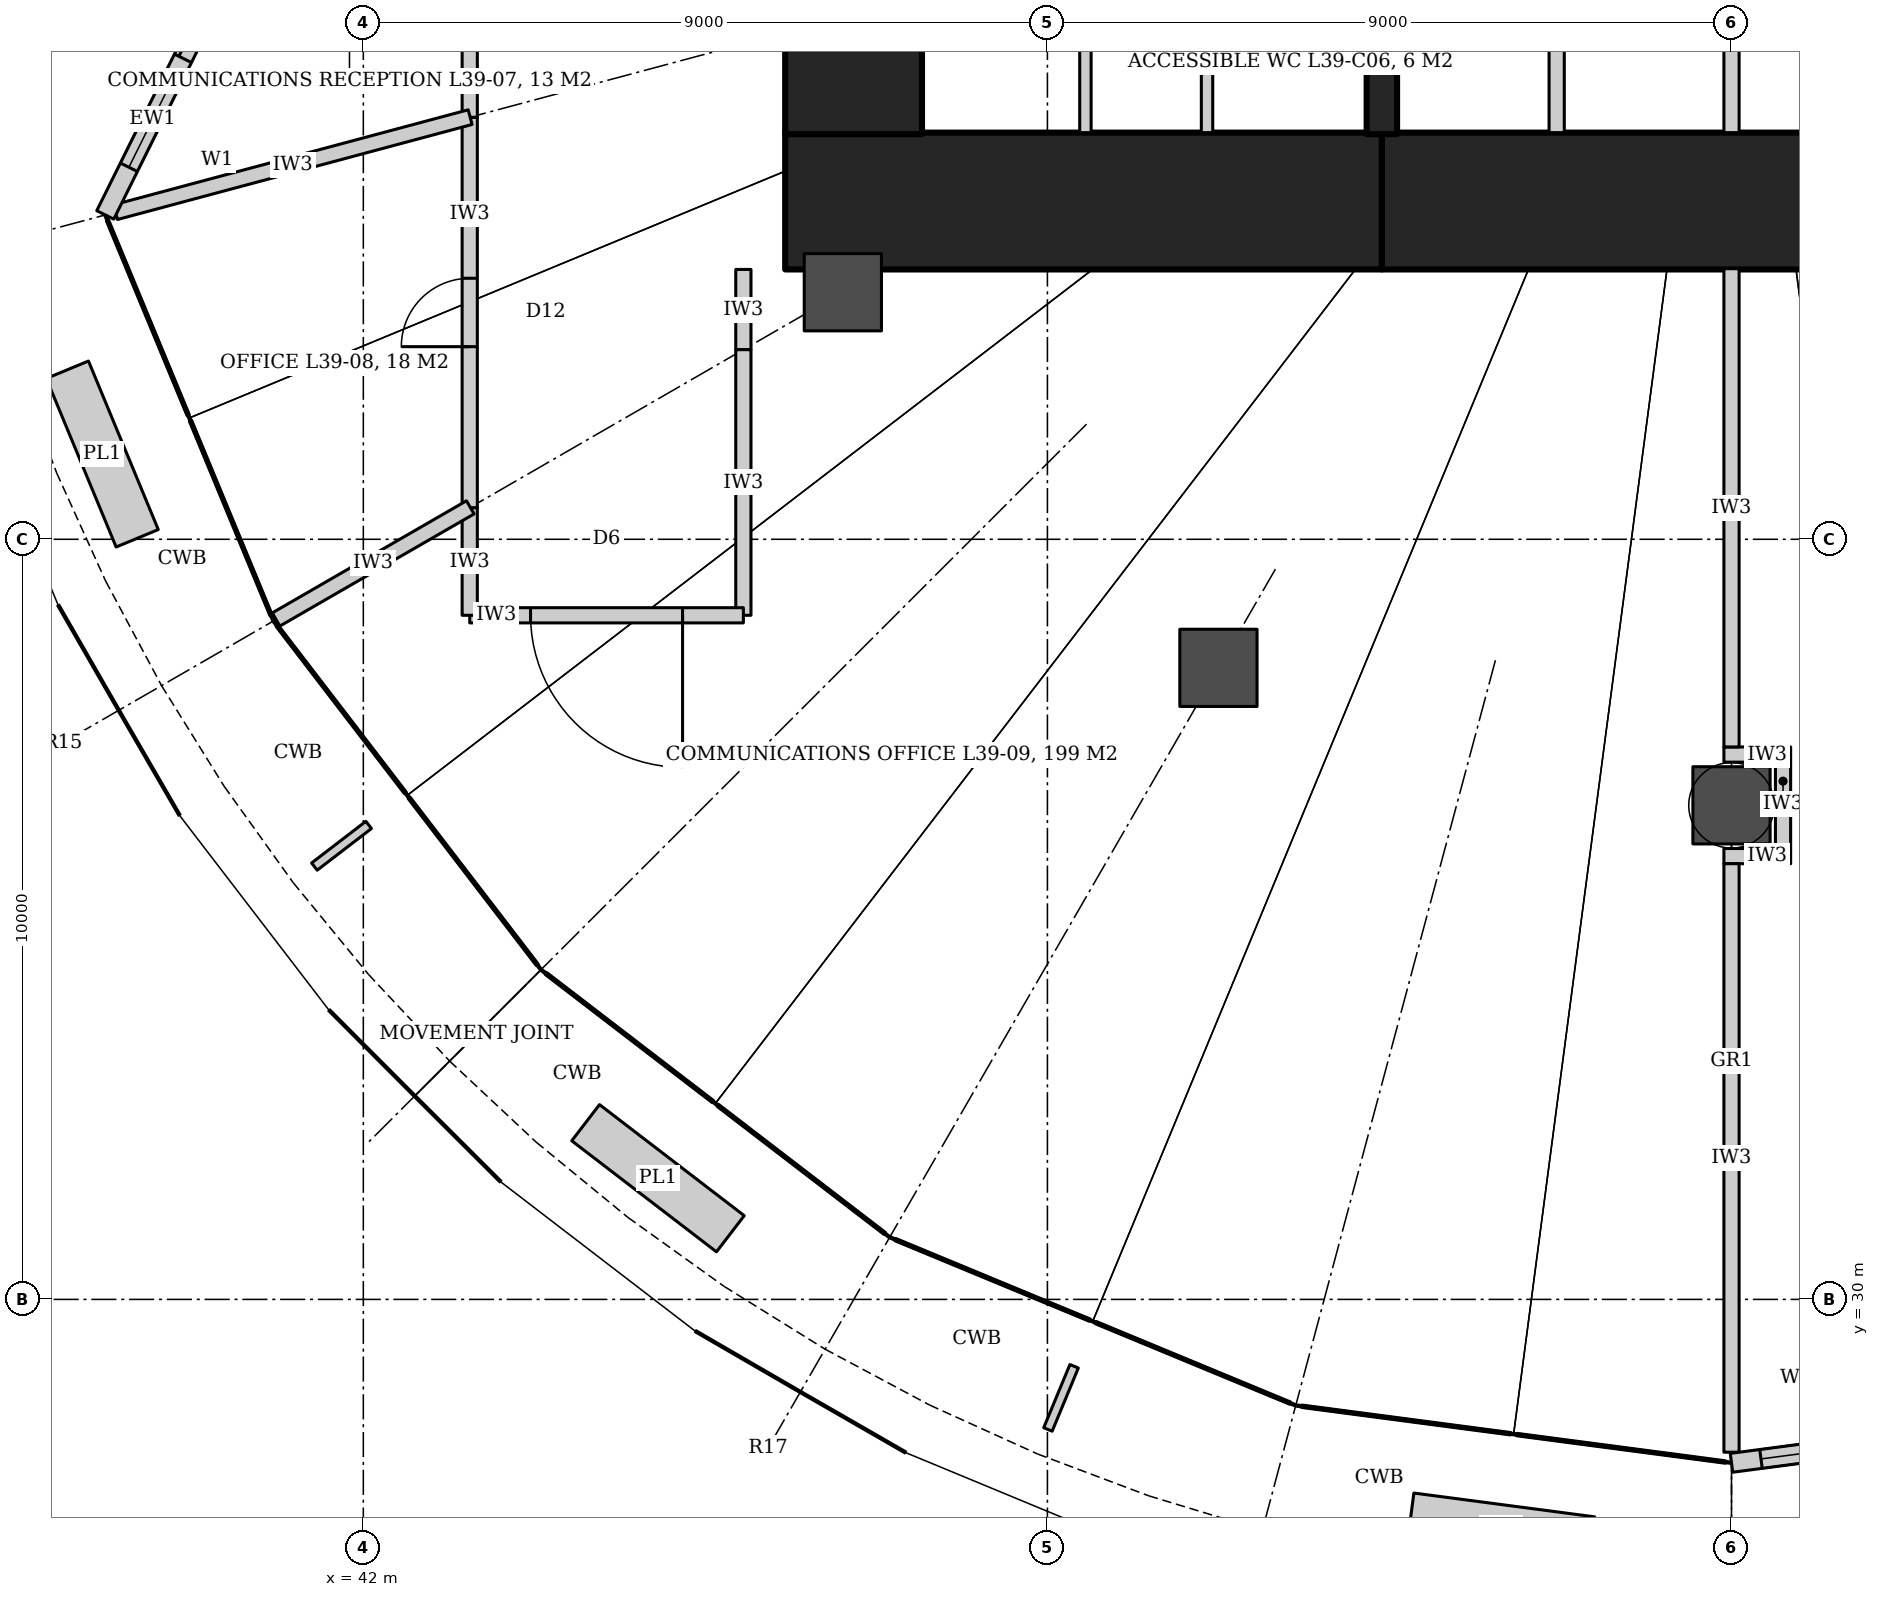
"""IFC4 building model, lengths in metres.
Left out: names, types, materials, properties, quantities, classifications, styles, units other than length and angle.
Written with IfcOpenShell. Run it as: python <this file> out.ifc"""

import sys

from ifc_helpers import new_model, si_unit, direction, frame, frame_2d, origin, origin_2d, place, context, subcontext, project, spatial, rectangle, hollow_circle, extrude, element, fill, save


model = new_model("IFC4")
c1 = context("Model", 3, precision=1e-05, world=origin(), true_north=direction((0.0, 1.0)))
c2 = subcontext(c1, "Body", "Model", "MODEL_VIEW")
j1 = project(units=[si_unit("LENGTHUNIT", "METRE"), si_unit("PLANEANGLEUNIT", "RADIAN")], contexts=[c1])
p1 = place(None, origin())
s1 = spatial("IfcSite", under=j1, at=p1, CompositionType="ELEMENT")
p2 = place(p1, origin())
s2 = spatial("IfcBuilding", under=s1, at=p2, CompositionType="ELEMENT")
p3 = place(p2, frame((0.0, 0.0, 173.0)))
s3 = spatial("IfcBuildingStorey", under=s2, at=p3, CompositionType="ELEMENT", Elevation=173.0)
p4 = place(p3, frame((47.55, 44.45, 0.0), z_axis=(0.0, 0.0, 1.0), x_axis=(1.0, 0.0, 0.0)))
e1 = element("IfcWall", 1, at=p4, inside=s3, PredefinedType="SHEAR", context=c2, shape_type="SweptSolid", body=[
    extrude(rectangle(XDim=7.85, YDim=1.8, at=frame_2d((3.925, 0.0))), origin(), (0.0, 0.0, 1.0), 4.2),
])
p5 = place(p3, frame((55.4, 44.45, 0.0), z_axis=(0.0, 0.0, 1.0), x_axis=(1.0, 0.0, 0.0)))
e2 = element("IfcWall", 2, at=p5, inside=s3, PredefinedType="SHEAR", context=c2, shape_type="SweptSolid", body=[
    extrude(rectangle(XDim=9.2, YDim=1.8, at=frame_2d((4.6, 0.0))), origin(), (0.0, 0.0, 1.0), 4.2),
])
p6 = place(p3, frame((48.45, 45.33, 0.0), z_axis=(0.0, 0.0, 1.0), x_axis=(0.0, 1.0, 0.0)))
e3 = element("IfcWall", 3, at=p6, inside=s3, PredefinedType="SHEAR", context=c2, shape_type="SweptSolid", body=[
    extrude(rectangle(XDim=3.17, YDim=1.8, at=frame_2d((1.585, 0.0))), origin(), (0.0, 0.0, 1.0), 4.2),
])
p7 = place(p3, frame((55.4, 48.32, 0.0), z_axis=(0.0, 0.0, 1.0), x_axis=(0.0, -1.0, 0.0)))
e4 = element("IfcWall", 4, at=p7, inside=s3, PredefinedType="SHEAR", context=c2, shape_type="SweptSolid", body=[
    extrude(rectangle(XDim=2.99, YDim=0.4, at=frame_2d((1.495, 0.0))), origin(), (0.0, 0.0, 1.0), 4.2),
])
for number, where, z_axis, x_axis in (
    (5, (48.309, 43.25, 0.0), (0.0, 0.0, 1.0), (1.0, 0.0, 0.0)),
    (6, (53.25, 38.309, 0.0), (0.0, 0.0, 1.0), (1.0, 0.0, 0.0)),
    (7, (60.0, 36.5, 0.0), (0.0, 0.0, 1.0), (1.0, 0.0, 0.0)),
):
    element("IfcColumn", number, at=place(p3, frame(where, z_axis=z_axis, x_axis=x_axis)), inside=s3, PredefinedType="COLUMN", context=c2, shape_type="SweptSolid", body=[
        extrude(hollow_circle(Radius=0.508, WallThickness=0.05, at=origin_2d()), origin(), (0.0, 0.0, 1.0), 4.2),
    ])
p8 = place(p3, frame((47.0, 43.55, 0.0), z_axis=(0.0, 0.0, 1.0), x_axis=(0.0, -1.0, 0.0)))
e8 = element("IfcWall", 8, at=p8, inside=s3, PredefinedType="PARTITIONING", context=c2, shape_type="SweptSolid", body=[
    extrude(rectangle(XDim=1.056, YDim=0.2, at=frame_2d((0.528, 0.0))), origin(), (0.0, 0.0, 1.0), 3.012),
])
p9 = place(p3, frame((47.0, 42.494, 0.0), z_axis=(0.0, 0.0, 1.0), x_axis=(0.0, -1.0, 0.0)))
e9 = element("IfcWall", 9, at=p9, inside=s3, PredefinedType="PARTITIONING", context=c2, shape_type="SweptSolid", body=[
    extrude(rectangle(XDim=3.494, YDim=0.2, at=frame_2d((1.747, 0.0))), origin(), (0.0, 0.0, 1.0), 3.012),
])
p10 = place(p3, frame((47.0, 39.0, 0.0), z_axis=(0.0, 0.0, 1.0), x_axis=(-1.0, 0.0, 0.0)))
e10 = element("IfcWall", 10, at=p10, inside=s3, PredefinedType="PARTITIONING", context=c2, shape_type="SweptSolid", body=[
    extrude(rectangle(XDim=3.6, YDim=0.2, at=frame_2d((1.8, 0.0))), origin(), (0.0, 0.0, 1.0), 3.04),
])
p11 = place(p10, frame((0.8, 0.0, 0.0)))
e11 = element("IfcOpeningElement", 11, at=p11, cuts=e10, PredefinedType="OPENING", context=c2, shape_type="SweptSolid", body=[
    extrude(rectangle(XDim=2.0, YDim=2.1, at=frame_2d((1.0, 1.05))), frame((0.0, 0.11, 0.0), z_axis=(0.0, -1.0, 0.0), x_axis=(1.0, 0.0, 0.0)), (0.0, 0.0, 1.0), 0.22),
])
p12 = place(p3, frame((43.4, 39.0, 0.0), z_axis=(0.0, 0.0, 1.0), x_axis=(0.0, 1.0, 0.0)))
e12 = element("IfcWall", 12, at=p12, inside=s3, PredefinedType="PARTITIONING", context=c2, shape_type="SweptSolid", body=[
    extrude(rectangle(XDim=1.416, YDim=0.2, at=frame_2d((0.708, 0.0))), origin(), (0.0, 0.0, 1.0), 3.012),
])
p13 = place(p3, frame((43.4, 40.416, 0.0), z_axis=(0.0, 0.0, 1.0), x_axis=(0.0, 1.0, 0.0)))
e13 = element("IfcWall", 13, at=p13, inside=s3, PredefinedType="PARTITIONING", context=c2, shape_type="SweptSolid", body=[
    extrude(rectangle(XDim=5.136, YDim=0.2, at=frame_2d((2.568, 0.0))), origin(), (0.0, 0.0, 1.0), 3.012),
])
p14 = place(p13, frame((2.118, 0.0, 0.0)))
e14 = element("IfcOpeningElement", 14, at=p14, cuts=e13, PredefinedType="OPENING", context=c2, shape_type="SweptSolid", body=[
    extrude(rectangle(XDim=0.9, YDim=2.4, at=frame_2d((0.45, 1.2))), frame((0.0, 0.11, 0.0), z_axis=(0.0, -1.0, 0.0), x_axis=(1.0, 0.0, 0.0)), (0.0, 0.0, 1.0), 0.22),
])
p15 = place(p3, frame((43.4, 45.552, 0.0), z_axis=(0.0, 0.0, 1.0), x_axis=(0.0, 1.0, 0.0)))
e15 = element("IfcWall", 15, at=p15, inside=s3, PredefinedType="PARTITIONING", context=c2, shape_type="SweptSolid", body=[
    extrude(rectangle(XDim=4.448, YDim=0.2, at=frame_2d((2.224, 0.0))), origin(), (0.0, 0.0, 1.0), 3.012),
])
p16 = place(p15, frame((1.424, 0.0, 0.0)))
e16 = element("IfcOpeningElement", 16, at=p16, cuts=e15, PredefinedType="OPENING", context=c2, shape_type="SweptSolid", body=[
    extrude(rectangle(XDim=1.6, YDim=2.4, at=frame_2d((0.8, 1.2))), frame((0.0, 0.11, 0.0), z_axis=(0.0, -1.0, 0.0), x_axis=(1.0, 0.0, 0.0)), (0.0, 0.0, 1.0), 0.22),
])
p17 = place(p3, frame((43.406, 45.553, 0.0), z_axis=(0.0, 0.0, 1.0), x_axis=(-0.965932258808, -0.25879503742, 0.0)))
e17 = element("IfcWall", 17, at=p17, inside=s3, PredefinedType="PARTITIONING", context=c2, shape_type="SweptSolid", body=[
    extrude(rectangle(XDim=4.83, YDim=0.2, at=frame_2d((2.415, 0.0))), origin(), (0.0, 0.0, 1.0), 3.012),
])
p18 = place(p3, frame((43.407, 40.42, 0.0), z_axis=(0.0, 0.0, 1.0), x_axis=(-0.866039495442, -0.49997559174, 0.0)))
e18 = element("IfcWall", 18, at=p18, inside=s3, PredefinedType="PARTITIONING", context=c2, shape_type="SweptSolid", body=[
    extrude(rectangle(XDim=2.95, YDim=0.2, at=frame_2d((1.475, 0.0))), origin(), (0.0, 0.0, 1.0), 3.012),
])
for number, where, z_axis, x_axis in (
    (19, (59.9, 37.168, 0.0), (0.0, 0.0, 1.0), (1.0, 0.0, 0.0)),
    (20, (59.9, 35.832, 0.0), (0.0, 0.0, 1.0), (1.0, 0.0, 0.0)),
):
    element("IfcWall", number, at=place(p3, frame(where, z_axis=z_axis, x_axis=x_axis)), inside=s3, PredefinedType="PARTITIONING", context=c2, shape_type="SweptSolid", body=[
        extrude(rectangle(XDim=0.878, YDim=0.2, at=frame_2d((0.439, 0.0))), origin(), (0.0, 0.0, 1.0), 3.012),
    ])
p19 = place(p3, frame((60.678, 37.068, 0.0), z_axis=(0.0, 0.0, 1.0), x_axis=(0.0, -1.0, 0.0)))
e21 = element("IfcWall", 21, at=p19, inside=s3, PredefinedType="PARTITIONING", context=c2, shape_type="SweptSolid", body=[
    extrude(rectangle(XDim=1.136, YDim=0.2, at=frame_2d((0.568, 0.0))), origin(), (0.0, 0.0, 1.0), 3.012),
])
p20 = place(p3, frame((60.0, 43.56, 0.0), z_axis=(0.0, 0.0, 1.0), x_axis=(0.0, -1.0, 0.0)))
e22 = element("IfcWall", 22, at=p20, inside=s3, PredefinedType="PARTITIONING", context=c2, shape_type="SweptSolid", body=[
    extrude(rectangle(XDim=6.292, YDim=0.2, at=frame_2d((3.146, 0.0))), origin(), (0.0, 0.0, 1.0), 3.04),
])
p21 = place(p3, frame((60.0, 35.732, 0.0), z_axis=(0.0, 0.0, 1.0), x_axis=(0.0, -1.0, 0.0)))
e23 = element("IfcWall", 23, at=p21, inside=s3, PredefinedType="PARTITIONING", context=c2, shape_type="SweptSolid", body=[
    extrude(rectangle(XDim=7.742, YDim=0.2, at=frame_2d((3.871, 0.0))), origin(), (0.0, 0.0, 1.0), 3.012),
])
p22 = place(p3, frame((41.45, 50.0, 0.0), z_axis=(0.0, 0.0, 1.0), x_axis=(-0.444556644785, -0.895750740763, 0.0)))
e24 = element("IfcWall", 24, at=p22, inside=s3, PredefinedType="SOLIDWALL", context=c2, shape_type="SweptSolid", body=[
    extrude(rectangle(XDim=6.4, YDim=0.25, at=frame_2d((3.2, 0.0))), origin(), (0.0, 0.0, 1.0), 4.04),
])
p23 = place(p22, frame((2.3, 0.0, 0.0)))
e25 = element("IfcOpeningElement", 25, at=p23, cuts=e24, PredefinedType="OPENING", context=c2, shape_type="SweptSolid", body=[
    extrude(rectangle(XDim=1.8, YDim=2.4, at=frame_2d((0.9, 1.2))), frame((0.0, 0.135, 0.0), z_axis=(0.0, -1.0, 0.0), x_axis=(1.0, 0.0, 0.0)), (0.0, 0.0, 1.0), 0.27),
])
p24 = place(p22, frame((0.7, 0.0, 0.0)))
e26 = element("IfcOpeningElement", 26, at=p24, cuts=e24, PredefinedType="OPENING", context=c2, shape_type="SweptSolid", body=[
    extrude(rectangle(XDim=1.2, YDim=2.4, at=frame_2d((0.6, 1.2))), frame((0.0, 0.135, 0.0), z_axis=(0.0, -1.0, 0.0), x_axis=(1.0, 0.0, 0.0)), (0.0, 0.0, 1.0), 0.27),
])
p25 = place(p22, frame((4.5, 0.0, 0.0)))
e27 = element("IfcOpeningElement", 27, at=p25, cuts=e24, PredefinedType="OPENING", context=c2, shape_type="SweptSolid", body=[
    extrude(rectangle(XDim=1.2, YDim=2.4, at=frame_2d((0.6, 1.2))), frame((0.0, 0.135, 0.0), z_axis=(0.0, -1.0, 0.0), x_axis=(1.0, 0.0, 0.0)), (0.0, 0.0, 1.0), 0.27),
])
p26 = place(p3, frame((60.0, 27.85, 0.0), z_axis=(0.0, 0.0, 1.0), x_axis=(0.991447396143, 0.130506937291, 0.0)))
e28 = element("IfcWall", 28, at=p26, inside=s3, PredefinedType="SOLIDWALL", context=c2, shape_type="SweptSolid", body=[
    extrude(rectangle(XDim=5.782, YDim=0.25, at=frame_2d((2.891, 0.0))), origin(), (0.0, 0.0, 1.0), 4.04),
])
p27 = place(p26, frame((1.991, 0.0, 0.0)))
e29 = element("IfcOpeningElement", 29, at=p27, cuts=e28, PredefinedType="OPENING", context=c2, shape_type="SweptSolid", body=[
    extrude(rectangle(XDim=1.8, YDim=2.4, at=frame_2d((0.9, 1.2))), frame((0.0, 0.135, 0.0), z_axis=(0.0, -1.0, 0.0), x_axis=(1.0, 0.0, 0.0)), (0.0, 0.0, 1.0), 0.27),
])
p28 = place(p26, frame((0.391, 0.0, 0.0)))
e30 = element("IfcOpeningElement", 30, at=p28, cuts=e28, PredefinedType="OPENING", context=c2, shape_type="SweptSolid", body=[
    extrude(rectangle(XDim=1.2, YDim=2.4, at=frame_2d((0.6, 1.2))), frame((0.0, 0.135, 0.0), z_axis=(0.0, -1.0, 0.0), x_axis=(1.0, 0.0, 0.0)), (0.0, 0.0, 1.0), 0.27),
])
p29 = place(p26, frame((4.191, 0.0, 0.0)))
e31 = element("IfcOpeningElement", 31, at=p29, cuts=e28, PredefinedType="OPENING", context=c2, shape_type="SweptSolid", body=[
    extrude(rectangle(XDim=1.2, YDim=2.4, at=frame_2d((0.6, 1.2))), frame((0.0, 0.135, 0.0), z_axis=(0.0, -1.0, 0.0), x_axis=(1.0, 0.0, 0.0)), (0.0, 0.0, 1.0), 0.27),
])
for number, where, z_axis, x_axis in (
    (32, (57.7, 45.35, 0.0), (0.0, 0.0, 1.0), (0.0, 1.0, 0.0)),
    (33, (60.0, 45.35, 0.0), (0.0, 0.0, 1.0), (0.0, 1.0, 0.0)),
):
    element("IfcWall", number, at=place(p3, frame(where, z_axis=z_axis, x_axis=x_axis)), inside=s3, PredefinedType="PARTITIONING", context=c2, shape_type="SweptSolid", body=[
        extrude(rectangle(XDim=2.95, YDim=0.2, at=frame_2d((1.475, 0.0))), origin(), (0.0, 0.0, 1.0), 4.2),
    ])
for number, where, z_axis, x_axis in (
    (34, (51.5, 45.35, 0.0), (0.0, 0.0, 1.0), (0.0, 1.0, 0.0)),
    (35, (53.1, 45.35, 0.0), (0.0, 0.0, 1.0), (0.0, 1.0, 0.0)),
):
    element("IfcWall", number, at=place(p3, frame(where, z_axis=z_axis, x_axis=x_axis)), inside=s3, PredefinedType="PARTITIONING", context=c2, shape_type="SweptSolid", body=[
        extrude(rectangle(XDim=2.95, YDim=0.15, at=frame_2d((1.475, 0.0))), origin(), (0.0, 0.0, 1.0), 4.04),
    ])
p30 = place(p14, origin())
e36 = element("IfcDoor", 36, at=p30, inside=s3, OperationType="SINGLE_SWING_LEFT", PredefinedType="DOOR", context=c2, shape_type="SweptSolid", body=[
    extrude(rectangle(XDim=0.9, YDim=2.4, at=frame_2d((0.45, 1.2))), frame((0.0, 0.025, 0.0), z_axis=(0.0, -1.0, 0.0), x_axis=(1.0, 0.0, 0.0)), (0.0, 0.0, 1.0), 0.05),
])
fill(e14, e36)
p31 = place(p11, origin())
e37 = element("IfcDoor", 37, at=p31, inside=s3, OperationType="DOUBLE_DOOR_DOUBLE_SWING", PredefinedType="DOOR", context=c2, shape_type="SweptSolid", body=[
    extrude(rectangle(XDim=2.0, YDim=2.1, at=frame_2d((1.0, 1.05))), frame((0.0, 0.025, 0.0), z_axis=(0.0, -1.0, 0.0), x_axis=(1.0, 0.0, 0.0)), (0.0, 0.0, 1.0), 0.05),
])
fill(e11, e37)
p32 = place(p23, origin())
e38 = element("IfcDoor", 38, at=p32, inside=s3, OperationType="DOUBLE_DOOR_SLIDING", PredefinedType="DOOR", context=c2, shape_type="SweptSolid", body=[
    extrude(rectangle(XDim=1.8, YDim=2.4, at=frame_2d((0.9, 1.2))), frame((0.0, 0.025, 0.0), z_axis=(0.0, -1.0, 0.0), x_axis=(1.0, 0.0, 0.0)), (0.0, 0.0, 1.0), 0.05),
])
fill(e25, e38)
p33 = place(p25, origin())
e39 = element("IfcWindow", 39, at=p33, inside=s3, PartitioningType="SINGLE_PANEL", PredefinedType="WINDOW", context=c2, shape_type="SweptSolid", body=[
    extrude(rectangle(XDim=1.2, YDim=2.4, at=frame_2d((0.6, 1.2))), frame((0.0, 0.03, 0.0), z_axis=(0.0, -1.0, 0.0), x_axis=(1.0, 0.0, 0.0)), (0.0, 0.0, 1.0), 0.06),
])
fill(e27, e39)
p34 = place(p28, origin())
e40 = element("IfcWindow", 40, at=p34, inside=s3, PartitioningType="SINGLE_PANEL", PredefinedType="WINDOW", context=c2, shape_type="SweptSolid", body=[
    extrude(rectangle(XDim=1.2, YDim=2.4, at=frame_2d((0.6, 1.2))), frame((0.0, 0.03, 0.0), z_axis=(0.0, -1.0, 0.0), x_axis=(1.0, 0.0, 0.0)), (0.0, 0.0, 1.0), 0.06),
])
fill(e30, e40)
save(model, sys.argv[1])
